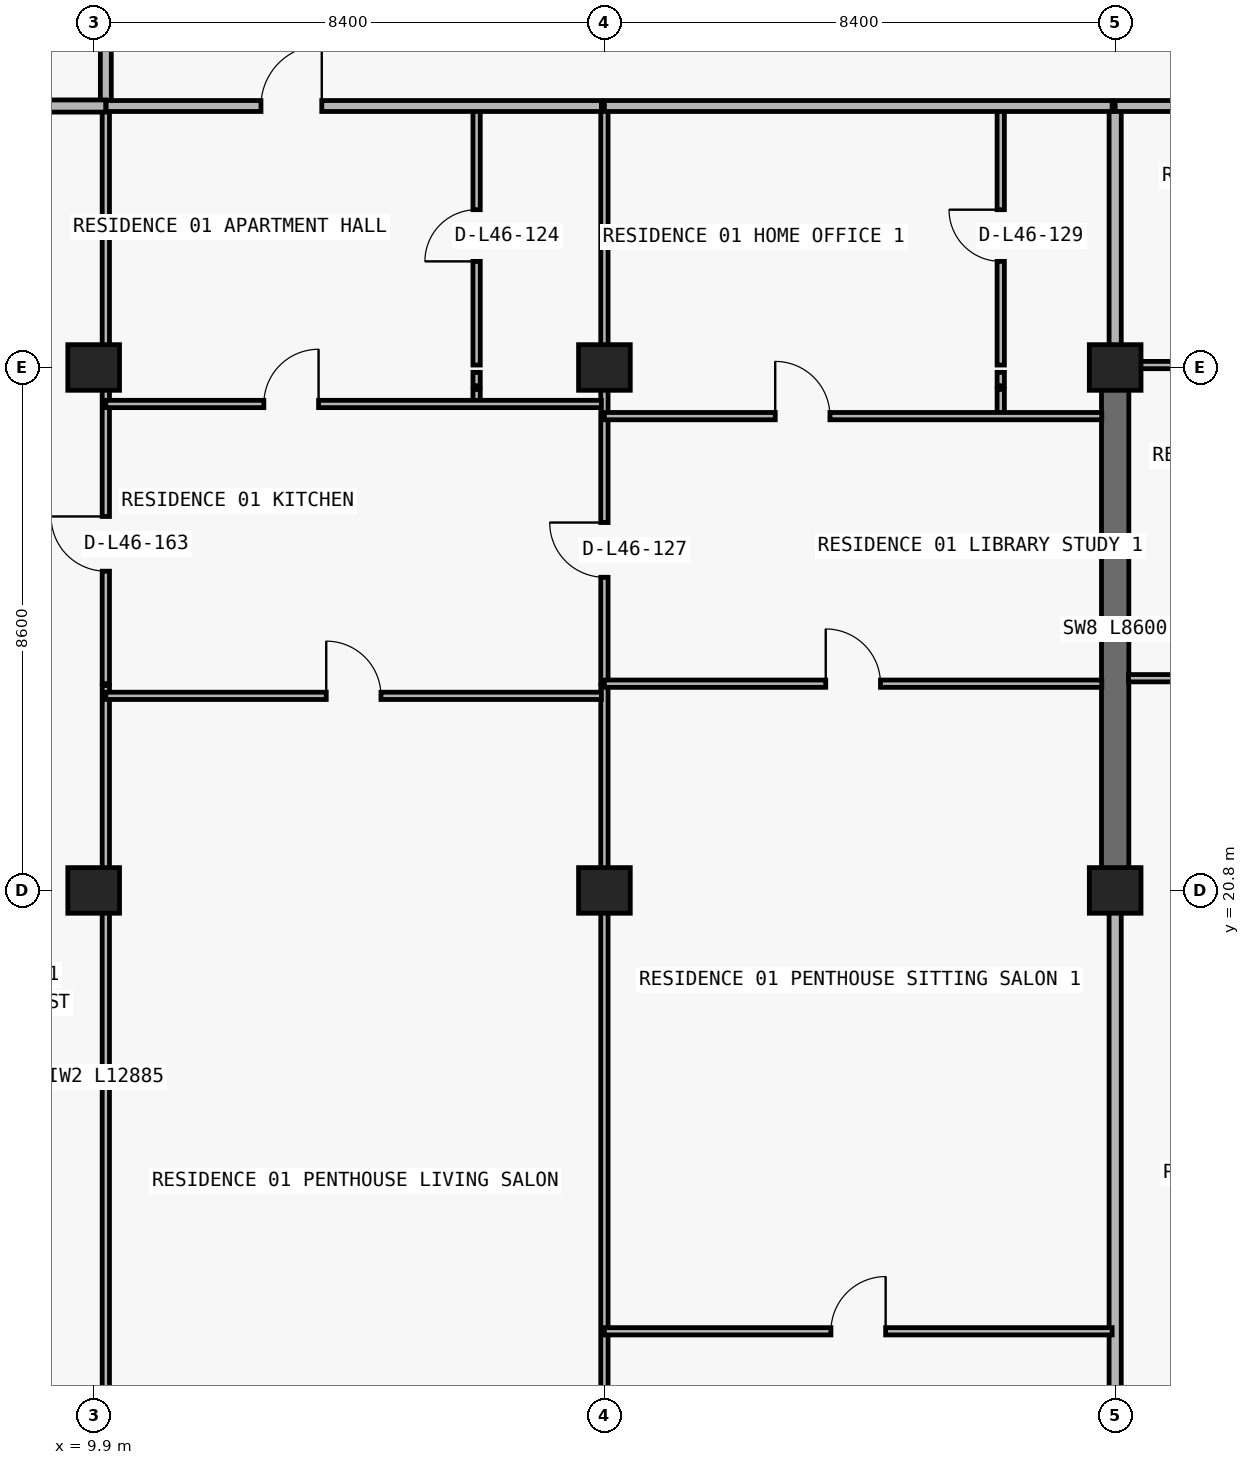
"""IFC4 building model, lengths in metres.
Left out: names, types, materials, properties, quantities, classifications, styles, units other than length and angle.
Written with IfcOpenShell. Run it as: python <this file> out.ifc"""

import sys

from ifc_helpers import new_model, si_unit, direction, frame, frame_2d, origin, origin_2d, place, context, subcontext, project, spatial, rectangle, extrude, element, fill, save


model = new_model("IFC4")
c1 = context("Model", 3, precision=1e-05, world=origin(), true_north=direction((0.0, 1.0)))
c2 = subcontext(c1, "Body", "Model", "MODEL_VIEW")
j1 = project(units=[si_unit("LENGTHUNIT", "METRE"), si_unit("PLANEANGLEUNIT", "RADIAN")], contexts=[c1])
p1 = place(None, origin())
s1 = spatial("IfcSite", under=j1, at=p1, CompositionType="ELEMENT")
p2 = place(p1, origin())
s2 = spatial("IfcBuilding", under=s1, at=p2, CompositionType="ELEMENT")
p3 = place(p2, frame((0.0, 0.0, 167.1)))
s3 = spatial("IfcBuildingStorey", under=s2, at=p3, CompositionType="ELEMENT", Elevation=167.1)
for number, where, z_axis, x_axis in (
    (1, (9.9, 20.8, 0.0), (0.0, 0.0, 1.0), (1.0, 0.0, 0.0)),
    (2, (18.3, 20.8, 0.0), (0.0, 0.0, 1.0), (1.0, 0.0, 0.0)),
    (3, (26.7, 20.8, 0.0), (0.0, 0.0, 1.0), (1.0, 0.0, 0.0)),
    (4, (9.9, 29.4, 0.0), (0.0, 0.0, 1.0), (1.0, 0.0, 0.0)),
    (5, (18.3, 29.4, 0.0), (0.0, 0.0, 1.0), (1.0, 0.0, 0.0)),
    (6, (26.7, 29.4, 0.0), (0.0, 0.0, 1.0), (1.0, 0.0, 0.0)),
):
    element("IfcColumn", number, at=place(p3, frame(where, z_axis=z_axis, x_axis=x_axis)), inside=s3, PredefinedType="COLUMN", context=c2, shape_type="SweptSolid", body=[
        extrude(rectangle(XDim=0.85, YDim=0.75, at=origin_2d()), origin(), (0.0, 0.0, 1.0), 3.05),
    ])
p4 = place(p3, frame((26.7, 20.8, 0.0), z_axis=(0.0, 0.0, 1.0), x_axis=(0.0, 1.0, 0.0)))
e7 = element("IfcWall", 7, at=p4, inside=s3, PredefinedType="SHEAR", context=c2, shape_type="SweptSolid", body=[
    extrude(rectangle(XDim=8.6, YDim=0.45, at=frame_2d((4.3, 0.0))), origin(), (0.0, 0.0, 1.0), 3.05),
])
p5 = place(p3, frame((10.1, 11.285, 0.0), z_axis=(0.0, 0.0, 1.0), x_axis=(0.0, 1.0, 0.0)))
e8 = element("IfcWall", 8, at=p5, inside=s3, PredefinedType="PARTITIONING", context=c2, shape_type="SweptSolid", body=[
    extrude(rectangle(XDim=12.885, YDim=0.12, at=frame_2d((6.442, 0.0))), origin(), (0.0, 0.0, 1.0), 2.263),
])
p6 = place(p3, frame((10.1, 24.2, 0.0), z_axis=(0.0, 0.0, 1.0), x_axis=(0.0, 1.0, 0.0)))
e9 = element("IfcWall", 9, at=p6, inside=s3, PredefinedType="PARTITIONING", context=c2, shape_type="SweptSolid", body=[
    extrude(rectangle(XDim=4.84, YDim=0.12, at=frame_2d((2.42, 0.0))), origin(), (0.0, 0.0, 1.0), 2.263),
])
p7 = place(p6, frame((1.85, 0.0, 0.0)))
e10 = element("IfcOpeningElement", 10, at=p7, cuts=e9, PredefinedType="OPENING", context=c2, shape_type="SweptSolid", body=[
    extrude(rectangle(XDim=0.9, YDim=2.15, at=frame_2d((0.45, 1.075))), frame((0.0, 0.07, 0.0), z_axis=(0.0, -1.0, 0.0), x_axis=(1.0, 0.0, 0.0)), (0.0, 0.0, 1.0), 0.14),
])
p8 = place(p3, frame((10.1, 29.1, 0.0), z_axis=(0.0, 0.0, 1.0), x_axis=(0.0, 1.0, 0.0)))
e11 = element("IfcWall", 11, at=p8, inside=s3, PredefinedType="PARTITIONING", context=c2, shape_type="SweptSolid", body=[
    extrude(rectangle(XDim=0.22, YDim=0.12, at=frame_2d((0.11, 0.0))), origin(), (0.0, 0.0, 1.0), 3.05),
])
p9 = place(p3, frame((10.1, 29.44, 0.0), z_axis=(0.0, 0.0, 1.0), x_axis=(0.0, 1.0, 0.0)))
e12 = element("IfcWall", 12, at=p9, inside=s3, PredefinedType="PARTITIONING", context=c2, shape_type="SweptSolid", body=[
    extrude(rectangle(XDim=4.26, YDim=0.12, at=frame_2d((2.13, 0.0))), origin(), (0.0, 0.0, 1.0), 2.263),
])
p10 = place(p3, frame((10.1, 33.705, 0.0), z_axis=(0.0, 0.0, 1.0), x_axis=(0.0, 1.0, 0.0)))
e13 = element("IfcWall", 13, at=p10, inside=s3, PredefinedType="PARTITIONING", context=c2, shape_type="SweptSolid", body=[
    extrude(rectangle(XDim=3.245, YDim=0.18, at=frame_2d((1.623, 0.0))), origin(), (0.0, 0.0, 1.0), 2.263),
])
p11 = place(p3, frame((16.198, 28.8, 0.0), z_axis=(0.0, 0.0, 1.0), x_axis=(0.0, 1.0, 0.0)))
e14 = element("IfcWall", 14, at=p11, inside=s3, PredefinedType="PARTITIONING", context=c2, shape_type="SweptSolid", body=[
    extrude(rectangle(XDim=0.24, YDim=0.12, at=frame_2d((0.12, 0.0))), origin(), (0.0, 0.0, 1.0), 3.05),
])
p12 = place(p3, frame((16.198, 29.1, 0.0), z_axis=(0.0, 0.0, 1.0), x_axis=(0.0, 1.0, 0.0)))
e15 = element("IfcWall", 15, at=p12, inside=s3, PredefinedType="PARTITIONING", context=c2, shape_type="SweptSolid", body=[
    extrude(rectangle(XDim=0.22, YDim=0.12, at=frame_2d((0.11, 0.0))), origin(), (0.0, 0.0, 1.0), 3.05),
])
p13 = place(p3, frame((16.198, 29.44, 0.0), z_axis=(0.0, 0.0, 1.0), x_axis=(0.0, 1.0, 0.0)))
e16 = element("IfcWall", 16, at=p13, inside=s3, PredefinedType="PARTITIONING", context=c2, shape_type="SweptSolid", body=[
    extrude(rectangle(XDim=4.26, YDim=0.12, at=frame_2d((2.13, 0.0))), origin(), (0.0, 0.0, 1.0), 3.05),
])
p14 = place(p13, frame((1.705, 0.0, 0.0)))
e17 = element("IfcOpeningElement", 17, at=p14, cuts=e16, PredefinedType="OPENING", context=c2, shape_type="SweptSolid", body=[
    extrude(rectangle(XDim=0.85, YDim=2.1, at=frame_2d((0.425, 1.05))), frame((0.0, 0.07, 0.0), z_axis=(0.0, -1.0, 0.0), x_axis=(1.0, 0.0, 0.0)), (0.0, 0.0, 1.0), 0.14),
])
p15 = place(p3, frame((18.3, 11.24, 0.0), z_axis=(0.0, 0.0, 1.0), x_axis=(0.0, 1.0, 0.0)))
e18 = element("IfcWall", 18, at=p15, inside=s3, PredefinedType="PARTITIONING", context=c2, shape_type="SweptSolid", body=[
    extrude(rectangle(XDim=12.93, YDim=0.12, at=frame_2d((6.465, 0.0))), origin(), (0.0, 0.0, 1.0), 2.263),
])
p16 = place(p3, frame((18.3, 24.2, 0.0), z_axis=(0.0, 0.0, 1.0), x_axis=(0.0, 1.0, 0.0)))
e19 = element("IfcWall", 19, at=p16, inside=s3, PredefinedType="PARTITIONING", context=c2, shape_type="SweptSolid", body=[
    extrude(rectangle(XDim=4.84, YDim=0.12, at=frame_2d((2.42, 0.0))), origin(), (0.0, 0.0, 1.0), 2.263),
])
p17 = place(p16, frame((1.75, 0.0, 0.0)))
e20 = element("IfcOpeningElement", 20, at=p17, cuts=e19, PredefinedType="OPENING", context=c2, shape_type="SweptSolid", body=[
    extrude(rectangle(XDim=0.9, YDim=2.15, at=frame_2d((0.45, 1.075))), frame((0.0, 0.07, 0.0), z_axis=(0.0, -1.0, 0.0), x_axis=(1.0, 0.0, 0.0)), (0.0, 0.0, 1.0), 0.14),
])
p18 = place(p3, frame((18.3, 29.1, 0.0), z_axis=(0.0, 0.0, 1.0), x_axis=(0.0, 1.0, 0.0)))
e21 = element("IfcWall", 21, at=p18, inside=s3, PredefinedType="PARTITIONING", context=c2, shape_type="SweptSolid", body=[
    extrude(rectangle(XDim=0.22, YDim=0.12, at=frame_2d((0.11, 0.0))), origin(), (0.0, 0.0, 1.0), 3.05),
])
p19 = place(p3, frame((18.3, 29.44, 0.0), z_axis=(0.0, 0.0, 1.0), x_axis=(0.0, 1.0, 0.0)))
e22 = element("IfcWall", 22, at=p19, inside=s3, PredefinedType="PARTITIONING", context=c2, shape_type="SweptSolid", body=[
    extrude(rectangle(XDim=4.26, YDim=0.12, at=frame_2d((2.13, 0.0))), origin(), (0.0, 0.0, 1.0), 2.263),
])
p20 = place(p3, frame((24.818, 28.6, 0.0), z_axis=(0.0, 0.0, 1.0), x_axis=(0.0, 1.0, 0.0)))
e23 = element("IfcWall", 23, at=p20, inside=s3, PredefinedType="PARTITIONING", context=c2, shape_type="SweptSolid", body=[
    extrude(rectangle(XDim=0.44, YDim=0.12, at=frame_2d((0.22, 0.0))), origin(), (0.0, 0.0, 1.0), 3.05),
])
p21 = place(p3, frame((24.818, 29.1, 0.0), z_axis=(0.0, 0.0, 1.0), x_axis=(0.0, 1.0, 0.0)))
e24 = element("IfcWall", 24, at=p21, inside=s3, PredefinedType="PARTITIONING", context=c2, shape_type="SweptSolid", body=[
    extrude(rectangle(XDim=0.22, YDim=0.12, at=frame_2d((0.11, 0.0))), origin(), (0.0, 0.0, 1.0), 3.05),
])
p22 = place(p3, frame((24.818, 29.44, 0.0), z_axis=(0.0, 0.0, 1.0), x_axis=(0.0, 1.0, 0.0)))
e25 = element("IfcWall", 25, at=p22, inside=s3, PredefinedType="PARTITIONING", context=c2, shape_type="SweptSolid", body=[
    extrude(rectangle(XDim=4.26, YDim=0.12, at=frame_2d((2.13, 0.0))), origin(), (0.0, 0.0, 1.0), 3.05),
])
p23 = place(p22, frame((1.705, 0.0, 0.0)))
e26 = element("IfcOpeningElement", 26, at=p23, cuts=e25, PredefinedType="OPENING", context=c2, shape_type="SweptSolid", body=[
    extrude(rectangle(XDim=0.85, YDim=2.1, at=frame_2d((0.425, 1.05))), frame((0.0, 0.07, 0.0), z_axis=(0.0, -1.0, 0.0), x_axis=(1.0, 0.0, 0.0)), (0.0, 0.0, 1.0), 0.14),
])
p24 = place(p3, frame((26.7, 11.24, 0.0), z_axis=(0.0, 0.0, 1.0), x_axis=(0.0, 1.0, 0.0)))
e27 = element("IfcWall", 27, at=p24, inside=s3, PredefinedType="PARTITIONING", context=c2, shape_type="SweptSolid", body=[
    extrude(rectangle(XDim=9.555, YDim=0.2, at=frame_2d((4.777, 0.0))), origin(), (0.0, 0.0, 1.0), 2.263),
])
p25 = place(p3, frame((26.7, 29.44, 0.0), z_axis=(0.0, 0.0, 1.0), x_axis=(0.0, 1.0, 0.0)))
e28 = element("IfcWall", 28, at=p25, inside=s3, PredefinedType="PARTITIONING", context=c2, shape_type="SweptSolid", body=[
    extrude(rectangle(XDim=4.26, YDim=0.2, at=frame_2d((2.13, 0.0))), origin(), (0.0, 0.0, 1.0), 2.335),
])
p26 = place(p3, frame((18.3, 13.55, 0.0), z_axis=(0.0, 0.0, 1.0), x_axis=(1.0, 0.0, 0.0)))
e29 = element("IfcWall", 29, at=p26, inside=s3, PredefinedType="PARTITIONING", context=c2, shape_type="SweptSolid", body=[
    extrude(rectangle(XDim=8.35, YDim=0.12, at=frame_2d((4.175, 0.0))), origin(), (0.0, 0.0, 1.0), 3.05),
])
p27 = place(p26, frame((3.725, 0.0, 0.0)))
e30 = element("IfcOpeningElement", 30, at=p27, cuts=e29, PredefinedType="OPENING", context=c2, shape_type="SweptSolid", body=[
    extrude(rectangle(XDim=0.9, YDim=2.15, at=frame_2d((0.45, 1.075))), frame((0.0, 0.07, 0.0), z_axis=(0.0, -1.0, 0.0), x_axis=(1.0, 0.0, 0.0)), (0.0, 0.0, 1.0), 0.14),
])
p28 = place(p3, frame((10.1, 24.0, 0.0), z_axis=(0.0, 0.0, 1.0), x_axis=(1.0, 0.0, 0.0)))
e31 = element("IfcWall", 31, at=p28, inside=s3, PredefinedType="PARTITIONING", context=c2, shape_type="SweptSolid", body=[
    extrude(rectangle(XDim=8.15, YDim=0.12, at=frame_2d((4.075, 0.0))), origin(), (0.0, 0.0, 1.0), 3.05),
])
p29 = place(p28, frame((3.625, 0.0, 0.0)))
e32 = element("IfcOpeningElement", 32, at=p29, cuts=e31, PredefinedType="OPENING", context=c2, shape_type="SweptSolid", body=[
    extrude(rectangle(XDim=0.9, YDim=2.15, at=frame_2d((0.45, 1.075))), frame((0.0, 0.07, 0.0), z_axis=(0.0, -1.0, 0.0), x_axis=(1.0, 0.0, 0.0)), (0.0, 0.0, 1.0), 0.14),
])
p30 = place(p3, frame((18.3, 24.2, 0.0), z_axis=(0.0, 0.0, 1.0), x_axis=(1.0, 0.0, 0.0)))
e33 = element("IfcWall", 33, at=p30, inside=s3, PredefinedType="PARTITIONING", context=c2, shape_type="SweptSolid", body=[
    extrude(rectangle(XDim=8.18, YDim=0.12, at=frame_2d((4.09, 0.0))), origin(), (0.0, 0.0, 1.0), 3.05),
])
p31 = place(p30, frame((3.64, 0.0, 0.0)))
e34 = element("IfcOpeningElement", 34, at=p31, cuts=e33, PredefinedType="OPENING", context=c2, shape_type="SweptSolid", body=[
    extrude(rectangle(XDim=0.9, YDim=2.15, at=frame_2d((0.45, 1.075))), frame((0.0, 0.07, 0.0), z_axis=(0.0, -1.0, 0.0), x_axis=(1.0, 0.0, 0.0)), (0.0, 0.0, 1.0), 0.14),
])
p32 = place(p3, frame((26.92, 24.29, 0.0), z_axis=(0.0, 0.0, 1.0), x_axis=(1.0, 0.0, 0.0)))
e35 = element("IfcWall", 35, at=p32, inside=s3, PredefinedType="PARTITIONING", context=c2, shape_type="SweptSolid", body=[
    extrude(rectangle(XDim=4.4, YDim=0.12, at=frame_2d((2.2, 0.0))), origin(), (0.0, 0.0, 1.0), 3.05),
])
p33 = place(p32, frame((1.583, 0.0, 0.0)))
e36 = element("IfcOpeningElement", 36, at=p33, cuts=e35, PredefinedType="OPENING", context=c2, shape_type="SweptSolid", body=[
    extrude(rectangle(XDim=0.9, YDim=2.15, at=frame_2d((0.45, 1.075))), frame((0.0, 0.07, 0.0), z_axis=(0.0, -1.0, 0.0), x_axis=(1.0, 0.0, 0.0)), (0.0, 0.0, 1.0), 0.14),
])
p34 = place(p3, frame((18.3, 28.6, 0.0), z_axis=(0.0, 0.0, 1.0), x_axis=(1.0, 0.0, 0.0)))
e37 = element("IfcWall", 37, at=p34, inside=s3, PredefinedType="PARTITIONING", context=c2, shape_type="SweptSolid", body=[
    extrude(rectangle(XDim=8.18, YDim=0.12, at=frame_2d((4.09, 0.0))), origin(), (0.0, 0.0, 1.0), 3.05),
])
p35 = place(p34, frame((2.809, 0.0, 0.0)))
e38 = element("IfcOpeningElement", 38, at=p35, cuts=e37, PredefinedType="OPENING", context=c2, shape_type="SweptSolid", body=[
    extrude(rectangle(XDim=0.9, YDim=2.15, at=frame_2d((0.45, 1.075))), frame((0.0, 0.07, 0.0), z_axis=(0.0, -1.0, 0.0), x_axis=(1.0, 0.0, 0.0)), (0.0, 0.0, 1.0), 0.14),
])
p36 = place(p3, frame((10.1, 28.8, 0.0), z_axis=(0.0, 0.0, 1.0), x_axis=(1.0, 0.0, 0.0)))
e39 = element("IfcWall", 39, at=p36, inside=s3, PredefinedType="PARTITIONING", context=c2, shape_type="SweptSolid", body=[
    extrude(rectangle(XDim=8.15, YDim=0.12, at=frame_2d((4.075, 0.0))), origin(), (0.0, 0.0, 1.0), 3.05),
])
p37 = place(p36, frame((2.599, 0.0, 0.0)))
e40 = element("IfcOpeningElement", 40, at=p37, cuts=e39, PredefinedType="OPENING", context=c2, shape_type="SweptSolid", body=[
    extrude(rectangle(XDim=0.9, YDim=2.15, at=frame_2d((0.45, 1.075))), frame((0.0, 0.07, 0.0), z_axis=(0.0, -1.0, 0.0), x_axis=(1.0, 0.0, 0.0)), (0.0, 0.0, 1.0), 0.14),
])
p38 = place(p3, frame((26.92, 29.44, 0.0), z_axis=(0.0, 0.0, 1.0), x_axis=(1.0, 0.0, 0.0)))
e41 = element("IfcWall", 41, at=p38, inside=s3, PredefinedType="PARTITIONING", context=c2, shape_type="SweptSolid", body=[
    extrude(rectangle(XDim=4.4, YDim=0.12, at=frame_2d((2.2, 0.0))), origin(), (0.0, 0.0, 1.0), 2.263),
])
p39 = place(p38, frame((1.583, 0.0, 0.0)))
e42 = element("IfcOpeningElement", 42, at=p39, cuts=e41, PredefinedType="OPENING", context=c2, shape_type="SweptSolid", body=[
    extrude(rectangle(XDim=0.9, YDim=2.15, at=frame_2d((0.45, 1.075))), frame((0.0, 0.07, 0.0), z_axis=(0.0, -1.0, 0.0), x_axis=(1.0, 0.0, 0.0)), (0.0, 0.0, 1.0), 0.14),
])
p40 = place(p3, frame((6.395, 33.7, 0.0), z_axis=(0.0, 0.0, 1.0), x_axis=(1.0, 0.0, 0.0)))
e43 = element("IfcWall", 43, at=p40, inside=s3, PredefinedType="PARTITIONING", context=c2, shape_type="SweptSolid", body=[
    extrude(rectangle(XDim=3.705, YDim=0.2, at=frame_2d((1.853, 0.0))), origin(), (0.0, 0.0, 1.0), 3.05),
])
p41 = place(p3, frame((10.105, 33.7, 0.0), z_axis=(0.0, 0.0, 1.0), x_axis=(1.0, 0.0, 0.0)))
e44 = element("IfcWall", 44, at=p41, inside=s3, PredefinedType="PARTITIONING", context=c2, shape_type="SweptSolid", body=[
    extrude(rectangle(XDim=8.145, YDim=0.18, at=frame_2d((4.073, 0.0))), origin(), (0.0, 0.0, 1.0), 3.05),
])
p42 = place(p41, frame((2.546, 0.0, 0.0)))
e45 = element("IfcOpeningElement", 45, at=p42, cuts=e44, PredefinedType="OPENING", context=c2, shape_type="SweptSolid", body=[
    extrude(rectangle(XDim=1.0, YDim=2.2, at=frame_2d((0.5, 1.1))), frame((0.0, 0.1, 0.0), z_axis=(0.0, -1.0, 0.0), x_axis=(1.0, 0.0, 0.0)), (0.0, 0.0, 1.0), 0.2),
])
p43 = place(p3, frame((18.3, 33.7, 0.0), z_axis=(0.0, 0.0, 1.0), x_axis=(1.0, 0.0, 0.0)))
e46 = element("IfcWall", 46, at=p43, inside=s3, PredefinedType="PARTITIONING", context=c2, shape_type="SweptSolid", body=[
    extrude(rectangle(XDim=8.35, YDim=0.18, at=frame_2d((4.175, 0.0))), origin(), (0.0, 0.0, 1.0), 3.05),
])
p44 = place(p3, frame((26.7, 33.7, 0.0), z_axis=(0.0, 0.0, 1.0), x_axis=(1.0, 0.0, 0.0)))
e47 = element("IfcWall", 47, at=p44, inside=s3, PredefinedType="PARTITIONING", context=c2, shape_type="SweptSolid", body=[
    extrude(rectangle(XDim=4.62, YDim=0.18, at=frame_2d((2.31, 0.0))), origin(), (0.0, 0.0, 1.0), 3.05),
])
p45 = place(p44, frame((1.81, 0.0, 0.0)))
e48 = element("IfcOpeningElement", 48, at=p45, cuts=e47, PredefinedType="OPENING", context=c2, shape_type="SweptSolid", body=[
    extrude(rectangle(XDim=1.0, YDim=2.2, at=frame_2d((0.5, 1.1))), frame((0.0, 0.1, 0.0), z_axis=(0.0, -1.0, 0.0), x_axis=(1.0, 0.0, 0.0)), (0.0, 0.0, 1.0), 0.2),
])
p46 = place(p42, origin())
e49 = element("IfcDoor", 49, at=p46, inside=s3, OperationType="SINGLE_SWING_RIGHT", PredefinedType="DOOR", context=c2, shape_type="SweptSolid", body=[
    extrude(rectangle(XDim=1.0, YDim=2.2, at=frame_2d((0.5, 1.1))), frame((0.0, 0.025, 0.0), z_axis=(0.0, -1.0, 0.0), x_axis=(1.0, 0.0, 0.0)), (0.0, 0.0, 1.0), 0.05),
])
fill(e45, e49)
p47 = place(p14, origin())
e50 = element("IfcDoor", 50, at=p47, inside=s3, OperationType="SINGLE_SWING_LEFT", PredefinedType="DOOR", context=c2, shape_type="SweptSolid", body=[
    extrude(rectangle(XDim=0.85, YDim=2.1, at=frame_2d((0.425, 1.05))), frame((0.0, 0.025, 0.0), z_axis=(0.0, -1.0, 0.0), x_axis=(1.0, 0.0, 0.0)), (0.0, 0.0, 1.0), 0.05),
])
fill(e17, e50)
p48 = place(p37, origin())
e51 = element("IfcDoor", 51, at=p48, inside=s3, OperationType="SINGLE_SWING_RIGHT", PredefinedType="DOOR", context=c2, shape_type="SweptSolid", body=[
    extrude(rectangle(XDim=0.9, YDim=2.15, at=frame_2d((0.45, 1.075))), frame((0.0, 0.025, 0.0), z_axis=(0.0, -1.0, 0.0), x_axis=(1.0, 0.0, 0.0)), (0.0, 0.0, 1.0), 0.05),
])
fill(e40, e51)
p49 = place(p29, origin())
e52 = element("IfcDoor", 52, at=p49, inside=s3, OperationType="SINGLE_SWING_LEFT", PredefinedType="DOOR", context=c2, shape_type="SweptSolid", body=[
    extrude(rectangle(XDim=0.9, YDim=2.15, at=frame_2d((0.45, 1.075))), frame((0.0, 0.025, 0.0), z_axis=(0.0, -1.0, 0.0), x_axis=(1.0, 0.0, 0.0)), (0.0, 0.0, 1.0), 0.05),
])
fill(e32, e52)
p50 = place(p17, origin())
e53 = element("IfcDoor", 53, at=p50, inside=s3, OperationType="SINGLE_SWING_RIGHT", PredefinedType="DOOR", context=c2, shape_type="SweptSolid", body=[
    extrude(rectangle(XDim=0.9, YDim=2.15, at=frame_2d((0.45, 1.075))), frame((0.0, 0.025, 0.0), z_axis=(0.0, -1.0, 0.0), x_axis=(1.0, 0.0, 0.0)), (0.0, 0.0, 1.0), 0.05),
])
fill(e20, e53)
p51 = place(p35, origin())
e54 = element("IfcDoor", 54, at=p51, inside=s3, OperationType="SINGLE_SWING_LEFT", PredefinedType="DOOR", context=c2, shape_type="SweptSolid", body=[
    extrude(rectangle(XDim=0.9, YDim=2.15, at=frame_2d((0.45, 1.075))), frame((0.0, 0.025, 0.0), z_axis=(0.0, -1.0, 0.0), x_axis=(1.0, 0.0, 0.0)), (0.0, 0.0, 1.0), 0.05),
])
fill(e38, e54)
p52 = place(p23, origin())
e55 = element("IfcDoor", 55, at=p52, inside=s3, OperationType="SINGLE_SWING_RIGHT", PredefinedType="DOOR", context=c2, shape_type="SweptSolid", body=[
    extrude(rectangle(XDim=0.85, YDim=2.1, at=frame_2d((0.425, 1.05))), frame((0.0, 0.025, 0.0), z_axis=(0.0, -1.0, 0.0), x_axis=(1.0, 0.0, 0.0)), (0.0, 0.0, 1.0), 0.05),
])
fill(e26, e55)
p53 = place(p31, origin())
e56 = element("IfcDoor", 56, at=p53, inside=s3, OperationType="SINGLE_SWING_LEFT", PredefinedType="DOOR", context=c2, shape_type="SweptSolid", body=[
    extrude(rectangle(XDim=0.9, YDim=2.15, at=frame_2d((0.45, 1.075))), frame((0.0, 0.025, 0.0), z_axis=(0.0, -1.0, 0.0), x_axis=(1.0, 0.0, 0.0)), (0.0, 0.0, 1.0), 0.05),
])
fill(e34, e56)
p54 = place(p27, origin())
e57 = element("IfcDoor", 57, at=p54, inside=s3, OperationType="SINGLE_SWING_RIGHT", PredefinedType="DOOR", context=c2, shape_type="SweptSolid", body=[
    extrude(rectangle(XDim=0.9, YDim=2.15, at=frame_2d((0.45, 1.075))), frame((0.0, 0.025, 0.0), z_axis=(0.0, -1.0, 0.0), x_axis=(1.0, 0.0, 0.0)), (0.0, 0.0, 1.0), 0.05),
])
fill(e30, e57)
p55 = place(p7, origin())
e58 = element("IfcDoor", 58, at=p55, inside=s3, OperationType="SINGLE_SWING_RIGHT", PredefinedType="DOOR", context=c2, shape_type="SweptSolid", body=[
    extrude(rectangle(XDim=0.9, YDim=2.15, at=frame_2d((0.45, 1.075))), frame((0.0, 0.025, 0.0), z_axis=(0.0, -1.0, 0.0), x_axis=(1.0, 0.0, 0.0)), (0.0, 0.0, 1.0), 0.05),
])
fill(e10, e58)
save(model, sys.argv[1])
